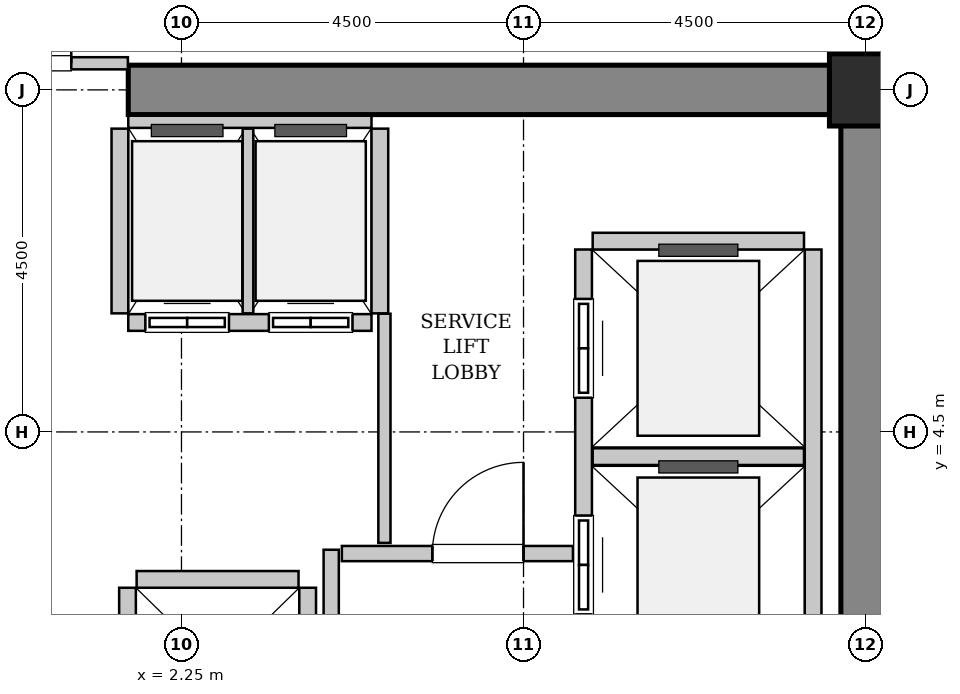
"""IFC4 building model, lengths in metres.
Left out: names, types, materials, properties, quantities, classifications, styles, units other than length and angle.
Written with IfcOpenShell. Run it as: python <this file> out.ifc"""

import sys

from ifc_helpers import new_model, si_unit, direction, frame, frame_2d, origin, origin_2d, place, context, subcontext, project, spatial, rectangle, hollow_rectangle, extrude, source, transform, mapped, element, fill, save


model = new_model("IFC4")
c1 = context("Model", 3, precision=1e-05, world=origin(), true_north=direction((0.0, 1.0)))
c2 = subcontext(c1, "Body", "Model", "MODEL_VIEW")
j1 = project(units=[si_unit("LENGTHUNIT", "METRE"), si_unit("PLANEANGLEUNIT", "RADIAN")], contexts=[c1])
p1 = place(None, origin())
s1 = spatial("IfcSite", under=j1, at=p1, CompositionType="ELEMENT")
p2 = place(p1, origin())
s2 = spatial("IfcBuilding", under=s1, at=p2, CompositionType="ELEMENT")
p3 = place(p2, frame((0.0, 0.0, 36.8)))
s3 = spatial("IfcBuildingStorey", under=s2, at=p3, CompositionType="ELEMENT", Elevation=36.8)
m1 = source(origin(), c2, "Body", "SweptSolid", [
    extrude(rectangle(XDim=10.025, YDim=0.65, at=frame_2d((5.012, 0.0))), origin(), (0.0, 0.0, 1.0), 3.8),
])
p4 = place(p3, frame((1.55, 9.0, 0.0), z_axis=(0.0, 0.0, 1.0), x_axis=(1.0, 0.0, 0.0)))
e1 = element("IfcWall", 1, at=p4, inside=s3, PredefinedType="SHEAR", context=c2, shape_type="MappedRepresentation", body=[
    mapped(m1, transform((0.0, 0.0, 0.0), x_axis=(1.0, 0.0, 0.0), y_axis=(0.0, 1.0, 0.0), z_axis=(0.0, 0.0, 1.0), scale=1.0)),
])
m2 = source(origin(), c2, "Body", "SweptSolid", [
    extrude(rectangle(XDim=7.325, YDim=0.65, at=frame_2d((3.663, 0.0))), origin(), (0.0, 0.0, 1.0), 3.8),
])
p5 = place(p3, frame((11.25, 1.35, 0.0), z_axis=(0.0, 0.0, 1.0), x_axis=(0.0, 1.0, 0.0)))
e2 = element("IfcWall", 2, at=p5, inside=s3, PredefinedType="SHEAR", context=c2, shape_type="MappedRepresentation", body=[
    mapped(m2, transform((0.0, 0.0, 0.0), x_axis=(1.0, 0.0, 0.0), y_axis=(0.0, 1.0, 0.0), z_axis=(0.0, 0.0, 1.0), scale=1.0)),
])
m3 = source(origin(), c2, "Body", "SweptSolid", [
    extrude(hollow_rectangle(XDim=0.95, YDim=0.95, WallThickness=0.045, InnerFilletRadius=0.045, OuterFilletRadius=0.09, at=origin_2d()), origin(), (0.0, 0.0, 1.0), 3.8),
])
p6 = place(p3, frame((11.25, 9.0, 0.0), z_axis=(0.0, 0.0, 1.0), x_axis=(1.0, 0.0, 0.0)))
e3 = element("IfcColumn", 3, at=p6, inside=s3, PredefinedType="COLUMN", context=c2, shape_type="MappedRepresentation", body=[
    mapped(m3, transform((0.0, 0.0, 0.0), x_axis=(1.0, 0.0, 0.0), y_axis=(0.0, 1.0, 0.0), z_axis=(0.0, 0.0, 1.0), scale=1.0)),
])
m4 = source(origin(), c2, "Body", "SweptSolid", [
    extrude(rectangle(XDim=5.45, YDim=0.22, at=frame_2d((2.725, 0.0))), origin(), (0.0, 0.0, 1.0), 3.535),
])
p7 = place(p3, frame((7.54, 6.9, 0.0), z_axis=(0.0, 0.0, 1.0), x_axis=(0.0, -1.0, 0.0)))
e4 = element("IfcWall", 4, at=p7, inside=s3, PredefinedType="SOLIDWALL", context=c2, shape_type="MappedRepresentation", body=[
    mapped(m4, transform((0.0, 0.0, 0.0), x_axis=(1.0, 0.0, 0.0), y_axis=(0.0, 1.0, 0.0), z_axis=(0.0, 0.0, 1.0), scale=1.0)),
])
p8 = place(p7, frame((3.5, 0.0, 0.0)))
e5 = element("IfcOpeningElement", 5, at=p8, cuts=e4, PredefinedType="OPENING", context=c2, shape_type="SweptSolid", body=[
    extrude(rectangle(XDim=1.3, YDim=2.3, at=frame_2d((0.65, 1.15))), frame((0.0, 0.12, 0.0), z_axis=(0.0, -1.0, 0.0), x_axis=(1.0, 0.0, 0.0)), (0.0, 0.0, 1.0), 0.24),
])
p9 = place(p7, frame((0.65, 0.0, 0.0)))
e6 = element("IfcOpeningElement", 6, at=p9, cuts=e4, PredefinedType="OPENING", context=c2, shape_type="SweptSolid", body=[
    extrude(rectangle(XDim=1.3, YDim=2.3, at=frame_2d((0.65, 1.15))), frame((0.0, 0.12, 0.0), z_axis=(0.0, -1.0, 0.0), x_axis=(1.0, 0.0, 0.0)), (0.0, 0.0, 1.0), 0.24),
])
p10 = place(p3, frame((10.56, 1.45, 0.0), z_axis=(0.0, 0.0, 1.0), x_axis=(0.0, 1.0, 0.0)))
e7 = element("IfcWall", 7, at=p10, inside=s3, PredefinedType="SOLIDWALL", context=c2, shape_type="MappedRepresentation", body=[
    mapped(m4, transform((0.0, 0.0, 0.0), x_axis=(1.0, 0.0, 0.0), y_axis=(0.0, 1.0, 0.0), z_axis=(0.0, 0.0, 1.0), scale=1.0)),
])
m5 = source(origin(), c2, "Body", "SweptSolid", [
    extrude(rectangle(XDim=2.78, YDim=0.22, at=frame_2d((1.39, 0.0))), origin(), (0.0, 0.0, 1.0), 3.535),
])
for number, where, z_axis, x_axis in (
    (8, (7.66, 4.175, 0.0), (0.0, 0.0, 1.0), (1.0, 0.0, 0.0)),
    (9, (10.44, 7.01, 0.0), (0.0, 0.0, 1.0), (-1.0, 0.0, 0.0)),
):
    element("IfcWall", number, at=place(p3, frame(where, z_axis=z_axis, x_axis=x_axis)), inside=s3, PredefinedType="SOLIDWALL", context=c2, shape_type="MappedRepresentation", body=[
        mapped(m5, transform((0.0, 0.0, 0.0), x_axis=(1.0, 0.0, 0.0), y_axis=(0.0, 1.0, 0.0), z_axis=(0.0, 0.0, 1.0), scale=1.0)),
    ])
m6 = source(origin(), c2, "Body", "SweptSolid", [
    extrude(rectangle(XDim=3.2, YDim=0.22, at=frame_2d((1.6, 0.0))), origin(), (0.0, 0.0, 1.0), 3.535),
])
p11 = place(p3, frame((1.55, 5.94, 0.0), z_axis=(0.0, 0.0, 1.0), x_axis=(1.0, 0.0, 0.0)))
e10 = element("IfcWall", 10, at=p11, inside=s3, PredefinedType="SOLIDWALL", context=c2, shape_type="MappedRepresentation", body=[
    mapped(m6, transform((0.0, 0.0, 0.0), x_axis=(1.0, 0.0, 0.0), y_axis=(0.0, 1.0, 0.0), z_axis=(0.0, 0.0, 1.0), scale=1.0)),
])
p12 = place(p11, frame((0.225, 0.0, 0.0)))
e11 = element("IfcOpeningElement", 11, at=p12, cuts=e10, PredefinedType="OPENING", context=c2, shape_type="SweptSolid", body=[
    extrude(rectangle(XDim=1.1, YDim=2.2, at=frame_2d((0.55, 1.1))), frame((0.0, 0.12, 0.0), z_axis=(0.0, -1.0, 0.0), x_axis=(1.0, 0.0, 0.0)), (0.0, 0.0, 1.0), 0.24),
])
p13 = place(p11, frame((1.85, 0.0, 0.0)))
e12 = element("IfcOpeningElement", 12, at=p13, cuts=e10, PredefinedType="OPENING", context=c2, shape_type="SweptSolid", body=[
    extrude(rectangle(XDim=1.1, YDim=2.2, at=frame_2d((0.55, 1.1))), frame((0.0, 0.12, 0.0), z_axis=(0.0, -1.0, 0.0), x_axis=(1.0, 0.0, 0.0)), (0.0, 0.0, 1.0), 0.24),
])
m7 = source(origin(), c2, "Body", "SweptSolid", [
    extrude(rectangle(XDim=3.2, YDim=0.16, at=frame_2d((1.6, 0.0))), origin(), (0.0, 0.0, 1.0), 2.425),
])
p14 = place(p3, frame((4.75, 8.58, 0.0), z_axis=(0.0, 0.0, 1.0), x_axis=(-1.0, 0.0, 0.0)))
e13 = element("IfcWall", 13, at=p14, inside=s3, PredefinedType="PARTITIONING", context=c2, shape_type="MappedRepresentation", body=[
    mapped(m7, transform((0.0, 0.0, 0.0), x_axis=(1.0, 0.0, 0.0), y_axis=(0.0, 1.0, 0.0), z_axis=(0.0, 0.0, 1.0), scale=1.0)),
])
m8 = source(origin(), c2, "Body", "SweptSolid", [
    extrude(rectangle(XDim=2.43, YDim=0.22, at=frame_2d((1.215, 0.0))), origin(), (0.0, 0.0, 1.0), 3.535),
])
p15 = place(p3, frame((1.44, 8.49, 0.0), z_axis=(0.0, 0.0, 1.0), x_axis=(0.0, -1.0, 0.0)))
e14 = element("IfcWall", 14, at=p15, inside=s3, PredefinedType="SOLIDWALL", context=c2, shape_type="MappedRepresentation", body=[
    mapped(m8, transform((0.0, 0.0, 0.0), x_axis=(1.0, 0.0, 0.0), y_axis=(0.0, 1.0, 0.0), z_axis=(0.0, 0.0, 1.0), scale=1.0)),
])
m9 = source(origin(), c2, "Body", "SweptSolid", [
    extrude(rectangle(XDim=2.43, YDim=0.14, at=frame_2d((1.215, 0.0))), origin(), (0.0, 0.0, 1.0), 3.535),
])
p16 = place(p3, frame((3.125, 6.06, 0.0), z_axis=(0.0, 0.0, 1.0), x_axis=(0.0, 1.0, 0.0)))
e15 = element("IfcWall", 15, at=p16, inside=s3, PredefinedType="PARTITIONING", context=c2, shape_type="MappedRepresentation", body=[
    mapped(m9, transform((0.0, 0.0, 0.0), x_axis=(1.0, 0.0, 0.0), y_axis=(0.0, 1.0, 0.0), z_axis=(0.0, 0.0, 1.0), scale=1.0)),
])
p17 = place(p3, frame((4.86, 6.06, 0.0), z_axis=(0.0, 0.0, 1.0), x_axis=(0.0, 1.0, 0.0)))
e16 = element("IfcWall", 16, at=p17, inside=s3, PredefinedType="SOLIDWALL", context=c2, shape_type="MappedRepresentation", body=[
    mapped(m8, transform((0.0, 0.0, 0.0), x_axis=(1.0, 0.0, 0.0), y_axis=(0.0, 1.0, 0.0), z_axis=(0.0, 0.0, 1.0), scale=1.0)),
])
m10 = source(origin(), c2, "Body", "SweptSolid", [
    extrude(rectangle(XDim=4.9, YDim=0.22, at=frame_2d((2.45, 0.0))), origin(), (0.0, 0.0, 1.0), 3.535),
])
for number, where, z_axis, x_axis in (
    (17, (1.54, 2.45, 0.0), (0.0, 0.0, 1.0), (0.0, -1.0, 0.0)),
    (18, (3.91, -2.45, 0.0), (0.0, 0.0, 1.0), (0.0, 1.0, 0.0)),
):
    element("IfcWall", number, at=place(p3, frame(where, z_axis=z_axis, x_axis=x_axis)), inside=s3, PredefinedType="SOLIDWALL", context=c2, shape_type="MappedRepresentation", body=[
        mapped(m10, transform((0.0, 0.0, 0.0), x_axis=(1.0, 0.0, 0.0), y_axis=(0.0, 1.0, 0.0), z_axis=(0.0, 0.0, 1.0), scale=1.0)),
    ])
m11 = source(origin(), c2, "Body", "SweptSolid", [
    extrude(rectangle(XDim=2.13, YDim=0.22, at=frame_2d((1.065, 0.0))), origin(), (0.0, 0.0, 1.0), 3.535),
])
p18 = place(p3, frame((3.79, 2.56, 0.0), z_axis=(0.0, 0.0, 1.0), x_axis=(-1.0, 0.0, 0.0)))
e19 = element("IfcWall", 19, at=p18, inside=s3, PredefinedType="SOLIDWALL", context=c2, shape_type="MappedRepresentation", body=[
    mapped(m11, transform((0.0, 0.0, 0.0), x_axis=(1.0, 0.0, 0.0), y_axis=(0.0, 1.0, 0.0), z_axis=(0.0, 0.0, 1.0), scale=1.0)),
])
m12 = source(origin(), c2, "Body", "SweptSolid", [
    extrude(rectangle(XDim=5.9, YDim=0.2, at=frame_2d((2.95, 0.0))), origin(), (0.0, 0.0, 1.0), 3.535),
])
p19 = place(p3, frame((4.22, -2.95, 0.0), z_axis=(0.0, 0.0, 1.0), x_axis=(0.0, 1.0, 0.0)))
e20 = element("IfcWall", 20, at=p19, inside=s3, PredefinedType="PARTITIONING", context=c2, shape_type="MappedRepresentation", body=[
    mapped(m12, transform((0.0, 0.0, 0.0), x_axis=(1.0, 0.0, 0.0), y_axis=(0.0, 1.0, 0.0), z_axis=(0.0, 0.0, 1.0), scale=1.0)),
])
m13 = source(origin(), c2, "Body", "SweptSolid", [
    extrude(rectangle(XDim=3.04, YDim=0.2, at=frame_2d((1.52, 0.0))), origin(), (0.0, 0.0, 1.0), 3.535),
])
p20 = place(p3, frame((4.36, 2.9, 0.0), z_axis=(0.0, 0.0, 1.0), x_axis=(1.0, 0.0, 0.0)))
e21 = element("IfcWall", 21, at=p20, inside=s3, PredefinedType="PARTITIONING", context=c2, shape_type="MappedRepresentation", body=[
    mapped(m13, transform((0.0, 0.0, 0.0), x_axis=(1.0, 0.0, 0.0), y_axis=(0.0, 1.0, 0.0), z_axis=(0.0, 0.0, 1.0), scale=1.0)),
])
p21 = place(p20, frame((1.19, 0.0, 0.0)))
e22 = element("IfcOpeningElement", 22, at=p21, cuts=e21, PredefinedType="OPENING", context=c2, shape_type="SweptSolid", body=[
    extrude(rectangle(XDim=1.2, YDim=2.15, at=frame_2d((0.6, 1.075))), frame((0.0, 0.11, 0.0), z_axis=(0.0, -1.0, 0.0), x_axis=(1.0, 0.0, 0.0)), (0.0, 0.0, 1.0), 0.22),
])
m14 = source(origin(), c2, "Body", "SweptSolid", [
    extrude(rectangle(XDim=3.09, YDim=0.16, at=frame_2d((1.545, 0.0))), origin(), (0.0, 0.0, 1.0), 2.425),
])
p22 = place(p3, frame((-1.545, 9.35, 0.0), z_axis=(0.0, 0.0, 1.0), x_axis=(1.0, 0.0, 0.0)))
e23 = element("IfcWall", 23, at=p22, inside=s3, PredefinedType="PARTITIONING", context=c2, shape_type="MappedRepresentation", body=[
    mapped(m14, transform((0.0, 0.0, 0.0), x_axis=(1.0, 0.0, 0.0), y_axis=(0.0, 1.0, 0.0), z_axis=(0.0, 0.0, 1.0), scale=1.0)),
])
p23 = place(p22, frame((0.745, 0.0, 0.0)))
e24 = element("IfcOpeningElement", 24, at=p23, cuts=e23, PredefinedType="OPENING", context=c2, shape_type="SweptSolid", body=[
    extrude(rectangle(XDim=1.6, YDim=2.3, at=frame_2d((0.8, 1.15))), frame((0.0, 0.09, 0.0), z_axis=(0.0, -1.0, 0.0), x_axis=(1.0, 0.0, 0.0)), (0.0, 0.0, 1.0), 0.18),
])
m15 = source(origin(), c2, "Body", "SweptSolid", [
    extrude(rectangle(XDim=3.015, YDim=0.16, at=frame_2d((1.507, 0.0))), origin(), (0.0, 0.0, 1.0), 3.535),
])
p24 = place(p3, frame((4.92, 3.04, 0.0), z_axis=(0.0, 0.0, 1.0), x_axis=(0.0, 1.0, 0.0)))
e25 = element("IfcWall", 25, at=p24, inside=s3, PredefinedType="PARTITIONING", context=c2, shape_type="MappedRepresentation", body=[
    mapped(m15, transform((0.0, 0.0, 0.0), x_axis=(1.0, 0.0, 0.0), y_axis=(0.0, 1.0, 0.0), z_axis=(0.0, 0.0, 1.0), scale=1.0)),
])
m16 = source(origin(), c2, "Body", "SweptSolid", [
    extrude(rectangle(XDim=1.3, YDim=2.3, at=frame_2d((0.65, 1.15))), frame((0.0, 0.025, 0.0), z_axis=(0.0, -1.0, 0.0), x_axis=(1.0, 0.0, 0.0)), (0.0, 0.0, 1.0), 0.05),
])
p25 = place(p8, origin())
e26 = element("IfcDoor", 26, at=p25, inside=s3, OperationType="SLIDING_TO_RIGHT", PredefinedType="DOOR", context=c2, shape_type="MappedRepresentation", body=[
    mapped(m16, transform((0.0, 0.0, 0.0), x_axis=(1.0, 0.0, 0.0), y_axis=(0.0, 1.0, 0.0), z_axis=(0.0, 0.0, 1.0), scale=1.0)),
])
fill(e5, e26)
p26 = place(p9, origin())
e27 = element("IfcDoor", 27, at=p26, inside=s3, OperationType="SLIDING_TO_RIGHT", PredefinedType="DOOR", context=c2, shape_type="MappedRepresentation", body=[
    mapped(m16, transform((0.0, 0.0, 0.0), x_axis=(1.0, 0.0, 0.0), y_axis=(0.0, 1.0, 0.0), z_axis=(0.0, 0.0, 1.0), scale=1.0)),
])
fill(e6, e27)
m17 = source(origin(), c2, "Body", "SweptSolid", [
    extrude(rectangle(XDim=1.1, YDim=2.2, at=frame_2d((0.55, 1.1))), frame((0.0, 0.025, 0.0), z_axis=(0.0, -1.0, 0.0), x_axis=(1.0, 0.0, 0.0)), (0.0, 0.0, 1.0), 0.05),
])
p27 = place(p12, origin())
e28 = element("IfcDoor", 28, at=p27, inside=s3, OperationType="DOUBLE_DOOR_SLIDING", PredefinedType="DOOR", context=c2, shape_type="MappedRepresentation", body=[
    mapped(m17, transform((0.0, 0.0, 0.0), x_axis=(1.0, 0.0, 0.0), y_axis=(0.0, 1.0, 0.0), z_axis=(0.0, 0.0, 1.0), scale=1.0)),
])
fill(e11, e28)
p28 = place(p13, origin())
e29 = element("IfcDoor", 29, at=p28, inside=s3, OperationType="DOUBLE_DOOR_SLIDING", PredefinedType="DOOR", context=c2, shape_type="MappedRepresentation", body=[
    mapped(m17, transform((0.0, 0.0, 0.0), x_axis=(1.0, 0.0, 0.0), y_axis=(0.0, 1.0, 0.0), z_axis=(0.0, 0.0, 1.0), scale=1.0)),
])
fill(e12, e29)
m18 = source(origin(), c2, "Body", "SweptSolid", [
    extrude(rectangle(XDim=1.2, YDim=2.15, at=frame_2d((0.6, 1.075))), frame((0.0, 0.025, 0.0), z_axis=(0.0, -1.0, 0.0), x_axis=(1.0, 0.0, 0.0)), (0.0, 0.0, 1.0), 0.05),
])
p29 = place(p21, origin())
e30 = element("IfcDoor", 30, at=p29, inside=s3, OperationType="SINGLE_SWING_RIGHT", PredefinedType="DOOR", context=c2, shape_type="MappedRepresentation", body=[
    mapped(m18, transform((0.0, 0.0, 0.0), x_axis=(1.0, 0.0, 0.0), y_axis=(0.0, 1.0, 0.0), z_axis=(0.0, 0.0, 1.0), scale=1.0)),
])
fill(e22, e30)
m19 = source(origin(), c2, "Body", "SweptSolid", [
    extrude(rectangle(XDim=1.6, YDim=2.3, at=frame_2d((0.8, 1.15))), frame((0.0, 0.025, 0.0), z_axis=(0.0, -1.0, 0.0), x_axis=(1.0, 0.0, 0.0)), (0.0, 0.0, 1.0), 0.05),
])
p30 = place(p23, origin())
e31 = element("IfcDoor", 31, at=p30, inside=s3, OperationType="DOUBLE_DOOR_SINGLE_SWING", PredefinedType="DOOR", context=c2, shape_type="MappedRepresentation", body=[
    mapped(m19, transform((0.0, 0.0, 0.0), x_axis=(1.0, 0.0, 0.0), y_axis=(0.0, 1.0, 0.0), z_axis=(0.0, 0.0, 1.0), scale=1.0)),
])
fill(e24, e31)
save(model, sys.argv[1])
